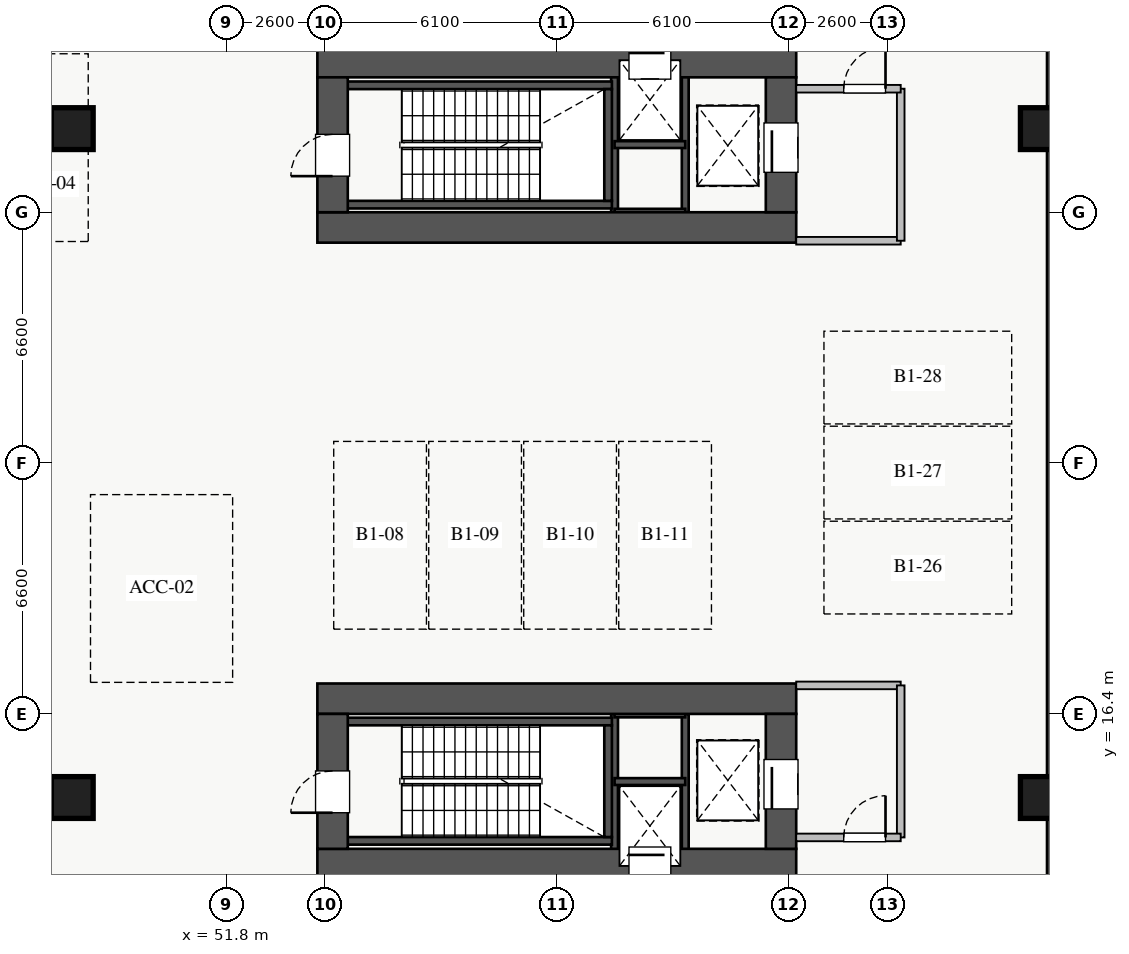
"""IFC4 building model, lengths in metres.
Left out: names, types, materials, properties, quantities, classifications, styles, units other than length and angle.
Written with IfcOpenShell. Run it as: python <this file> out.ifc"""

import sys

from ifc_helpers import new_model, si_unit, direction, frame, frame_2d, origin, origin_2d, place, context, subcontext, project, spatial, rectangle, extrude, source, transform, mapped, element, fill, save


model = new_model("IFC4")
c1 = context("Model", 3, precision=1e-05, world=origin(), true_north=direction((0.0, 1.0)))
c2 = subcontext(c1, "Body", "Model", "MODEL_VIEW")
j1 = project(units=[si_unit("LENGTHUNIT", "METRE"), si_unit("PLANEANGLEUNIT", "RADIAN")], contexts=[c1])
p1 = place(None, origin())
s1 = spatial("IfcSite", under=j1, at=p1, CompositionType="ELEMENT")
p2 = place(p1, origin())
s2 = spatial("IfcBuilding", under=s1, at=p2, CompositionType="ELEMENT")
p3 = place(p2, frame((0.0, 0.0, -4.8)))
s3 = spatial("IfcBuildingStorey", under=s2, at=p3, CompositionType="ELEMENT", Elevation=-4.8)
for number, where, z_axis, x_axis in (
    (1, (62.02, 29.6, 0.0), (0.0, 0.0, 1.0), (0.0, 1.0, 0.0)),
    (2, (63.88, 29.6, 0.0), (0.0, 0.0, 1.0), (0.0, 1.0, 0.0)),
):
    element("IfcWall", number, at=place(p3, frame(where, z_axis=z_axis, x_axis=x_axis)), inside=s3, PredefinedType="SHEAR", context=c2, shape_type="SweptSolid", body=[
        extrude(rectangle(XDim=3.95, YDim=0.18, at=frame_2d((1.975, 0.0))), origin(), (0.0, 0.0, 1.0), 4.58),
    ])
for number, where, z_axis, x_axis in (
    (3, (62.02, 31.38, 0.0), (0.0, 0.0, 1.0), (1.0, 0.0, 0.0)),
    (4, (62.02, 29.6, 0.0), (0.0, 0.0, 1.0), (1.0, 0.0, 0.0)),
):
    element("IfcWall", number, at=place(p3, frame(where, z_axis=z_axis, x_axis=x_axis)), inside=s3, PredefinedType="SHEAR", context=c2, shape_type="SweptSolid", body=[
        extrude(rectangle(XDim=1.86, YDim=0.18, at=frame_2d((0.93, 0.0))), origin(), (0.0, 0.0, 1.0), 4.58),
    ])
for number, where, z_axis, x_axis in (
    (5, (62.02, 12.45, 0.0), (0.0, 0.0, 1.0), (0.0, 1.0, 0.0)),
    (6, (63.88, 12.45, 0.0), (0.0, 0.0, 1.0), (0.0, 1.0, 0.0)),
):
    element("IfcWall", number, at=place(p3, frame(where, z_axis=z_axis, x_axis=x_axis)), inside=s3, PredefinedType="SHEAR", context=c2, shape_type="SweptSolid", body=[
        extrude(rectangle(XDim=3.95, YDim=0.18, at=frame_2d((1.975, 0.0))), origin(), (0.0, 0.0, 1.0), 4.58),
    ])
for number, where, z_axis, x_axis in (
    (7, (62.02, 14.62, 0.0), (0.0, 0.0, 1.0), (1.0, 0.0, 0.0)),
    (8, (62.02, 16.4, 0.0), (0.0, 0.0, 1.0), (1.0, 0.0, 0.0)),
):
    element("IfcWall", number, at=place(p3, frame(where, z_axis=z_axis, x_axis=x_axis)), inside=s3, PredefinedType="SHEAR", context=c2, shape_type="SweptSolid", body=[
        extrude(rectangle(XDim=1.86, YDim=0.18, at=frame_2d((0.93, 0.0))), origin(), (0.0, 0.0, 1.0), 4.58),
    ])
for number, where, z_axis, x_axis in (
    (9, (54.8, 29.8, 0.0), (0.0, 0.0, 1.0), (1.0, 0.0, 0.0)),
    (10, (54.8, 32.94, 0.0), (0.0, 0.0, 1.0), (1.0, 0.0, 0.0)),
):
    element("IfcWall", number, at=place(p3, frame(where, z_axis=z_axis, x_axis=x_axis)), inside=s3, PredefinedType="SHEAR", context=c2, shape_type="SweptSolid", body=[
        extrude(rectangle(XDim=7.15, YDim=0.2, at=frame_2d((3.575, 0.0))), origin(), (0.0, 0.0, 1.0), 4.8),
    ])
p4 = place(p3, frame((61.85, 29.9, 0.0), z_axis=(0.0, 0.0, 1.0), x_axis=(0.0, 1.0, 0.0)))
e11 = element("IfcWall", 11, at=p4, inside=s3, PredefinedType="SHEAR", context=c2, shape_type="SweptSolid", body=[
    extrude(rectangle(XDim=2.94, YDim=0.2, at=frame_2d((1.47, 0.0))), origin(), (0.0, 0.0, 1.0), 4.8),
])
for number, where, z_axis, x_axis in (
    (12, (54.8, 13.06, 0.0), (0.0, 0.0, 1.0), (1.0, 0.0, 0.0)),
    (13, (54.8, 16.2, 0.0), (0.0, 0.0, 1.0), (1.0, 0.0, 0.0)),
):
    element("IfcWall", number, at=place(p3, frame(where, z_axis=z_axis, x_axis=x_axis)), inside=s3, PredefinedType="SHEAR", context=c2, shape_type="SweptSolid", body=[
        extrude(rectangle(XDim=7.15, YDim=0.2, at=frame_2d((3.575, 0.0))), origin(), (0.0, 0.0, 1.0), 4.8),
    ])
p5 = place(p3, frame((61.85, 13.16, 0.0), z_axis=(0.0, 0.0, 1.0), x_axis=(0.0, 1.0, 0.0)))
e14 = element("IfcWall", 14, at=p5, inside=s3, PredefinedType="SHEAR", context=c2, shape_type="SweptSolid", body=[
    extrude(rectangle(XDim=2.94, YDim=0.2, at=frame_2d((1.47, 0.0))), origin(), (0.0, 0.0, 1.0), 4.8),
])
p6 = place(p3, frame((73.7, 0.6, 0.0), z_axis=(0.0, 0.0, 1.0), x_axis=(0.0, 1.0, 0.0)))
e15 = element("IfcWall", 15, at=p6, inside=s3, PredefinedType="SOLIDWALL", context=c2, shape_type="SweptSolid", body=[
    extrude(rectangle(XDim=44.8, YDim=0.6, at=frame_2d((22.4, 0.0))), origin(), (0.0, 0.0, 1.0), 4.8),
])
p7 = place(p3, frame((54.2, 29.2, 0.0), z_axis=(0.0, 0.0, 1.0), x_axis=(1.0, 0.0, 0.0)))
e16 = element("IfcWall", 16, at=p7, inside=s3, PredefinedType="SHEAR", context=c2, shape_type="SweptSolid", body=[
    extrude(rectangle(XDim=12.6, YDim=0.8, at=frame_2d((6.3, 0.0))), origin(), (0.0, 0.0, 1.0), 4.8),
])
p8 = place(p3, frame((54.2, 33.55, 0.0), z_axis=(0.0, 0.0, 1.0), x_axis=(1.0, 0.0, 0.0)))
e17 = element("IfcWall", 17, at=p8, inside=s3, PredefinedType="SHEAR", context=c2, shape_type="SweptSolid", body=[
    extrude(rectangle(XDim=12.6, YDim=0.8, at=frame_2d((6.3, 0.0))), origin(), (0.0, 0.0, 1.0), 4.8),
])
p9 = place(p8, frame((8.2, 0.0, 0.0)))
e18 = element("IfcOpeningElement", 18, at=p9, cuts=e17, PredefinedType="OPENING", context=c2, shape_type="SweptSolid", body=[
    extrude(rectangle(XDim=1.1, YDim=2.05, at=frame_2d((0.55, 1.025))), frame((0.0, 0.41, 0.0), z_axis=(0.0, -1.0, 0.0), x_axis=(1.0, 0.0, 0.0)), (0.0, 0.0, 1.0), 0.82),
])
p10 = place(p3, frame((54.6, 29.6, 0.0), z_axis=(0.0, 0.0, 1.0), x_axis=(0.0, 1.0, 0.0)))
e19 = element("IfcWall", 19, at=p10, inside=s3, PredefinedType="SHEAR", context=c2, shape_type="SweptSolid", body=[
    extrude(rectangle(XDim=3.55, YDim=0.8, at=frame_2d((1.775, 0.0))), origin(), (0.0, 0.0, 1.0), 4.8),
])
p11 = place(p10, frame((0.95, 0.0, 0.0)))
e20 = element("IfcOpeningElement", 20, at=p11, cuts=e19, PredefinedType="OPENING", context=c2, shape_type="SweptSolid", body=[
    extrude(rectangle(XDim=1.1, YDim=2.05, at=frame_2d((0.55, 1.025))), frame((0.0, 0.41, 0.0), z_axis=(0.0, -1.0, 0.0), x_axis=(1.0, 0.0, 0.0)), (0.0, 0.0, 1.0), 0.82),
])
p12 = place(p3, frame((66.4, 29.6, 0.0), z_axis=(0.0, 0.0, 1.0), x_axis=(0.0, 1.0, 0.0)))
e21 = element("IfcWall", 21, at=p12, inside=s3, PredefinedType="SHEAR", context=c2, shape_type="SweptSolid", body=[
    extrude(rectangle(XDim=3.55, YDim=0.8, at=frame_2d((1.775, 0.0))), origin(), (0.0, 0.0, 1.0), 4.8),
])
p13 = place(p12, frame((1.05, 0.0, 0.0)))
e22 = element("IfcOpeningElement", 22, at=p13, cuts=e21, PredefinedType="OPENING", context=c2, shape_type="SweptSolid", body=[
    extrude(rectangle(XDim=1.3, YDim=2.05, at=frame_2d((0.65, 1.025))), frame((0.0, 0.41, 0.0), z_axis=(0.0, -1.0, 0.0), x_axis=(1.0, 0.0, 0.0)), (0.0, 0.0, 1.0), 0.82),
])
p14 = place(p3, frame((54.2, 12.45, 0.0), z_axis=(0.0, 0.0, 1.0), x_axis=(1.0, 0.0, 0.0)))
e23 = element("IfcWall", 23, at=p14, inside=s3, PredefinedType="SHEAR", context=c2, shape_type="SweptSolid", body=[
    extrude(rectangle(XDim=12.6, YDim=0.8, at=frame_2d((6.3, 0.0))), origin(), (0.0, 0.0, 1.0), 4.8),
])
p15 = place(p14, frame((8.2, 0.0, 0.0)))
e24 = element("IfcOpeningElement", 24, at=p15, cuts=e23, PredefinedType="OPENING", context=c2, shape_type="SweptSolid", body=[
    extrude(rectangle(XDim=1.1, YDim=2.05, at=frame_2d((0.55, 1.025))), frame((0.0, 0.41, 0.0), z_axis=(0.0, -1.0, 0.0), x_axis=(1.0, 0.0, 0.0)), (0.0, 0.0, 1.0), 0.82),
])
p16 = place(p3, frame((54.2, 16.8, 0.0), z_axis=(0.0, 0.0, 1.0), x_axis=(1.0, 0.0, 0.0)))
e25 = element("IfcWall", 25, at=p16, inside=s3, PredefinedType="SHEAR", context=c2, shape_type="SweptSolid", body=[
    extrude(rectangle(XDim=12.6, YDim=0.8, at=frame_2d((6.3, 0.0))), origin(), (0.0, 0.0, 1.0), 4.8),
])
p17 = place(p3, frame((54.6, 12.85, 0.0), z_axis=(0.0, 0.0, 1.0), x_axis=(0.0, 1.0, 0.0)))
e26 = element("IfcWall", 26, at=p17, inside=s3, PredefinedType="SHEAR", context=c2, shape_type="SweptSolid", body=[
    extrude(rectangle(XDim=3.55, YDim=0.8, at=frame_2d((1.775, 0.0))), origin(), (0.0, 0.0, 1.0), 4.8),
])
p18 = place(p17, frame((0.95, 0.0, 0.0)))
e27 = element("IfcOpeningElement", 27, at=p18, cuts=e26, PredefinedType="OPENING", context=c2, shape_type="SweptSolid", body=[
    extrude(rectangle(XDim=1.1, YDim=2.05, at=frame_2d((0.55, 1.025))), frame((0.0, 0.41, 0.0), z_axis=(0.0, -1.0, 0.0), x_axis=(1.0, 0.0, 0.0)), (0.0, 0.0, 1.0), 0.82),
])
p19 = place(p3, frame((66.4, 12.85, 0.0), z_axis=(0.0, 0.0, 1.0), x_axis=(0.0, 1.0, 0.0)))
e28 = element("IfcWall", 28, at=p19, inside=s3, PredefinedType="SHEAR", context=c2, shape_type="SweptSolid", body=[
    extrude(rectangle(XDim=3.55, YDim=0.8, at=frame_2d((1.775, 0.0))), origin(), (0.0, 0.0, 1.0), 4.8),
])
p20 = place(p19, frame((1.05, 0.0, 0.0)))
e29 = element("IfcOpeningElement", 29, at=p20, cuts=e28, PredefinedType="OPENING", context=c2, shape_type="SweptSolid", body=[
    extrude(rectangle(XDim=1.3, YDim=2.05, at=frame_2d((0.65, 1.025))), frame((0.0, 0.41, 0.0), z_axis=(0.0, -1.0, 0.0), x_axis=(1.0, 0.0, 0.0)), (0.0, 0.0, 1.0), 0.82),
])
m1 = source(origin(), c2, "Body", "SweptSolid", [
    extrude(rectangle(XDim=1.1, YDim=1.1, at=origin_2d()), origin(), (0.0, 0.0, 1.0), 4.8),
])
for number, where, z_axis, x_axis in (
    (30, (73.25, 14.2, 0.0), (0.0, 0.0, 1.0), (1.0, 0.0, 0.0)),
    (31, (73.25, 31.8, 0.0), (0.0, 0.0, 1.0), (1.0, 0.0, 0.0)),
    (32, (47.75, 14.2, 0.0), (0.0, 0.0, 1.0), (1.0, 0.0, 0.0)),
    (33, (47.75, 31.8, 0.0), (0.0, 0.0, 1.0), (1.0, 0.0, 0.0)),
):
    element("IfcColumn", number, at=place(p3, frame(where, z_axis=z_axis, x_axis=x_axis)), inside=s3, PredefinedType="COLUMN", context=c2, shape_type="MappedRepresentation", body=[
        mapped(m1, transform((0.0, 0.0, 0.0), x_axis=(1.0, 0.0, 0.0), y_axis=(0.0, 1.0, 0.0), z_axis=(0.0, 0.0, 1.0), scale=1.0)),
    ])
p21 = place(p3, frame((66.8, 28.85, 0.0), z_axis=(0.0, 0.0, 1.0), x_axis=(1.0, 0.0, 0.0)))
e34 = element("IfcWall", 34, at=p21, inside=s3, PredefinedType="PARTITIONING", context=c2, shape_type="SweptSolid", body=[
    extrude(rectangle(XDim=2.75, YDim=0.2, at=frame_2d((1.375, 0.0))), origin(), (0.0, 0.0, 1.0), 4.58),
])
p22 = place(p3, frame((69.55, 28.85, 0.0), z_axis=(0.0, 0.0, 1.0), x_axis=(0.0, 1.0, 0.0)))
e35 = element("IfcWall", 35, at=p22, inside=s3, PredefinedType="PARTITIONING", context=c2, shape_type="SweptSolid", body=[
    extrude(rectangle(XDim=4.0, YDim=0.2, at=frame_2d((2.0, 0.0))), origin(), (0.0, 0.0, 1.0), 4.58),
])
p23 = place(p3, frame((66.8, 32.85, 0.0), z_axis=(0.0, 0.0, 1.0), x_axis=(1.0, 0.0, 0.0)))
e36 = element("IfcWall", 36, at=p23, inside=s3, PredefinedType="PARTITIONING", context=c2, shape_type="SweptSolid", body=[
    extrude(rectangle(XDim=2.75, YDim=0.2, at=frame_2d((1.375, 0.0))), origin(), (0.0, 0.0, 1.0), 4.58),
])
p24 = place(p23, frame((1.25, 0.0, 0.0)))
e37 = element("IfcOpeningElement", 37, at=p24, cuts=e36, PredefinedType="OPENING", context=c2, shape_type="SweptSolid", body=[
    extrude(rectangle(XDim=1.1, YDim=2.05, at=frame_2d((0.55, 1.025))), frame((0.0, 0.11, 0.0), z_axis=(0.0, -1.0, 0.0), x_axis=(1.0, 0.0, 0.0)), (0.0, 0.0, 1.0), 0.22),
])
p25 = place(p3, frame((66.8, 17.15, 0.0), z_axis=(0.0, 0.0, 1.0), x_axis=(1.0, 0.0, 0.0)))
e38 = element("IfcWall", 38, at=p25, inside=s3, PredefinedType="PARTITIONING", context=c2, shape_type="SweptSolid", body=[
    extrude(rectangle(XDim=2.75, YDim=0.2, at=frame_2d((1.375, 0.0))), origin(), (0.0, 0.0, 1.0), 4.58),
])
p26 = place(p3, frame((69.55, 13.15, 0.0), z_axis=(0.0, 0.0, 1.0), x_axis=(0.0, 1.0, 0.0)))
e39 = element("IfcWall", 39, at=p26, inside=s3, PredefinedType="PARTITIONING", context=c2, shape_type="SweptSolid", body=[
    extrude(rectangle(XDim=4.0, YDim=0.2, at=frame_2d((2.0, 0.0))), origin(), (0.0, 0.0, 1.0), 4.58),
])
p27 = place(p3, frame((66.8, 13.15, 0.0), z_axis=(0.0, 0.0, 1.0), x_axis=(1.0, 0.0, 0.0)))
e40 = element("IfcWall", 40, at=p27, inside=s3, PredefinedType="PARTITIONING", context=c2, shape_type="SweptSolid", body=[
    extrude(rectangle(XDim=2.75, YDim=0.2, at=frame_2d((1.375, 0.0))), origin(), (0.0, 0.0, 1.0), 4.58),
])
p28 = place(p27, frame((1.25, 0.0, 0.0)))
e41 = element("IfcOpeningElement", 41, at=p28, cuts=e40, PredefinedType="OPENING", context=c2, shape_type="SweptSolid", body=[
    extrude(rectangle(XDim=1.1, YDim=2.05, at=frame_2d((0.55, 1.025))), frame((0.0, 0.11, 0.0), z_axis=(0.0, -1.0, 0.0), x_axis=(1.0, 0.0, 0.0)), (0.0, 0.0, 1.0), 0.22),
])
m2 = source(origin(), c2, "Body", "SweptSolid", [
    extrude(rectangle(XDim=1.3, YDim=2.05, at=frame_2d((0.65, 1.025))), frame((0.0, 0.025, 0.0), z_axis=(0.0, -1.0, 0.0), x_axis=(1.0, 0.0, 0.0)), (0.0, 0.0, 1.0), 0.05),
])
p29 = place(p13, origin())
e42 = element("IfcDoor", 42, at=p29, inside=s3, OperationType="SLIDING_TO_LEFT", PredefinedType="DOOR", context=c2, shape_type="MappedRepresentation", body=[
    mapped(m2, transform((0.0, 0.0, 0.0), x_axis=(1.0, 0.0, 0.0), y_axis=(0.0, 1.0, 0.0), z_axis=(0.0, 0.0, 1.0), scale=1.0)),
])
fill(e22, e42)
m3 = source(origin(), c2, "Body", "SweptSolid", [
    extrude(rectangle(XDim=1.1, YDim=2.05, at=frame_2d((0.55, 1.025))), frame((0.0, 0.025, 0.0), z_axis=(0.0, -1.0, 0.0), x_axis=(1.0, 0.0, 0.0)), (0.0, 0.0, 1.0), 0.05),
])
p30 = place(p11, origin())
e43 = element("IfcDoor", 43, at=p30, inside=s3, OperationType="SINGLE_SWING_LEFT", PredefinedType="DOOR", context=c2, shape_type="MappedRepresentation", body=[
    mapped(m3, transform((0.0, 0.0, 0.0), x_axis=(1.0, 0.0, 0.0), y_axis=(0.0, 1.0, 0.0), z_axis=(0.0, 0.0, 1.0), scale=1.0)),
])
fill(e20, e43)
p31 = place(p9, origin())
e44 = element("IfcDoor", 44, at=p31, inside=s3, OperationType="SLIDING_TO_LEFT", PredefinedType="DOOR", context=c2, shape_type="MappedRepresentation", body=[
    mapped(m3, transform((0.0, 0.0, 0.0), x_axis=(1.0, 0.0, 0.0), y_axis=(0.0, 1.0, 0.0), z_axis=(0.0, 0.0, 1.0), scale=1.0)),
])
fill(e18, e44)
p32 = place(p20, origin())
e45 = element("IfcDoor", 45, at=p32, inside=s3, OperationType="SLIDING_TO_RIGHT", PredefinedType="DOOR", context=c2, shape_type="MappedRepresentation", body=[
    mapped(m2, transform((0.0, 0.0, 0.0), x_axis=(1.0, 0.0, 0.0), y_axis=(0.0, 1.0, 0.0), z_axis=(0.0, 0.0, 1.0), scale=1.0)),
])
fill(e29, e45)
p33 = place(p18, origin())
e46 = element("IfcDoor", 46, at=p33, inside=s3, OperationType="SINGLE_SWING_LEFT", PredefinedType="DOOR", context=c2, shape_type="MappedRepresentation", body=[
    mapped(m3, transform((0.0, 0.0, 0.0), x_axis=(1.0, 0.0, 0.0), y_axis=(0.0, 1.0, 0.0), z_axis=(0.0, 0.0, 1.0), scale=1.0)),
])
fill(e27, e46)
p34 = place(p15, origin())
e47 = element("IfcDoor", 47, at=p34, inside=s3, OperationType="SLIDING_TO_RIGHT", PredefinedType="DOOR", context=c2, shape_type="MappedRepresentation", body=[
    mapped(m3, transform((0.0, 0.0, 0.0), x_axis=(1.0, 0.0, 0.0), y_axis=(0.0, 1.0, 0.0), z_axis=(0.0, 0.0, 1.0), scale=1.0)),
])
fill(e24, e47)
p35 = place(p24, origin())
e48 = element("IfcDoor", 48, at=p35, inside=s3, OperationType="SINGLE_SWING_RIGHT", PredefinedType="DOOR", context=c2, shape_type="MappedRepresentation", body=[
    mapped(m3, transform((0.0, 0.0, 0.0), x_axis=(1.0, 0.0, 0.0), y_axis=(0.0, 1.0, 0.0), z_axis=(0.0, 0.0, 1.0), scale=1.0)),
])
fill(e37, e48)
p36 = place(p28, origin())
e49 = element("IfcDoor", 49, at=p36, inside=s3, OperationType="SINGLE_SWING_RIGHT", PredefinedType="DOOR", context=c2, shape_type="MappedRepresentation", body=[
    mapped(m3, transform((0.0, 0.0, 0.0), x_axis=(1.0, 0.0, 0.0), y_axis=(0.0, 1.0, 0.0), z_axis=(0.0, 0.0, 1.0), scale=1.0)),
])
fill(e41, e49)
save(model, sys.argv[1])
